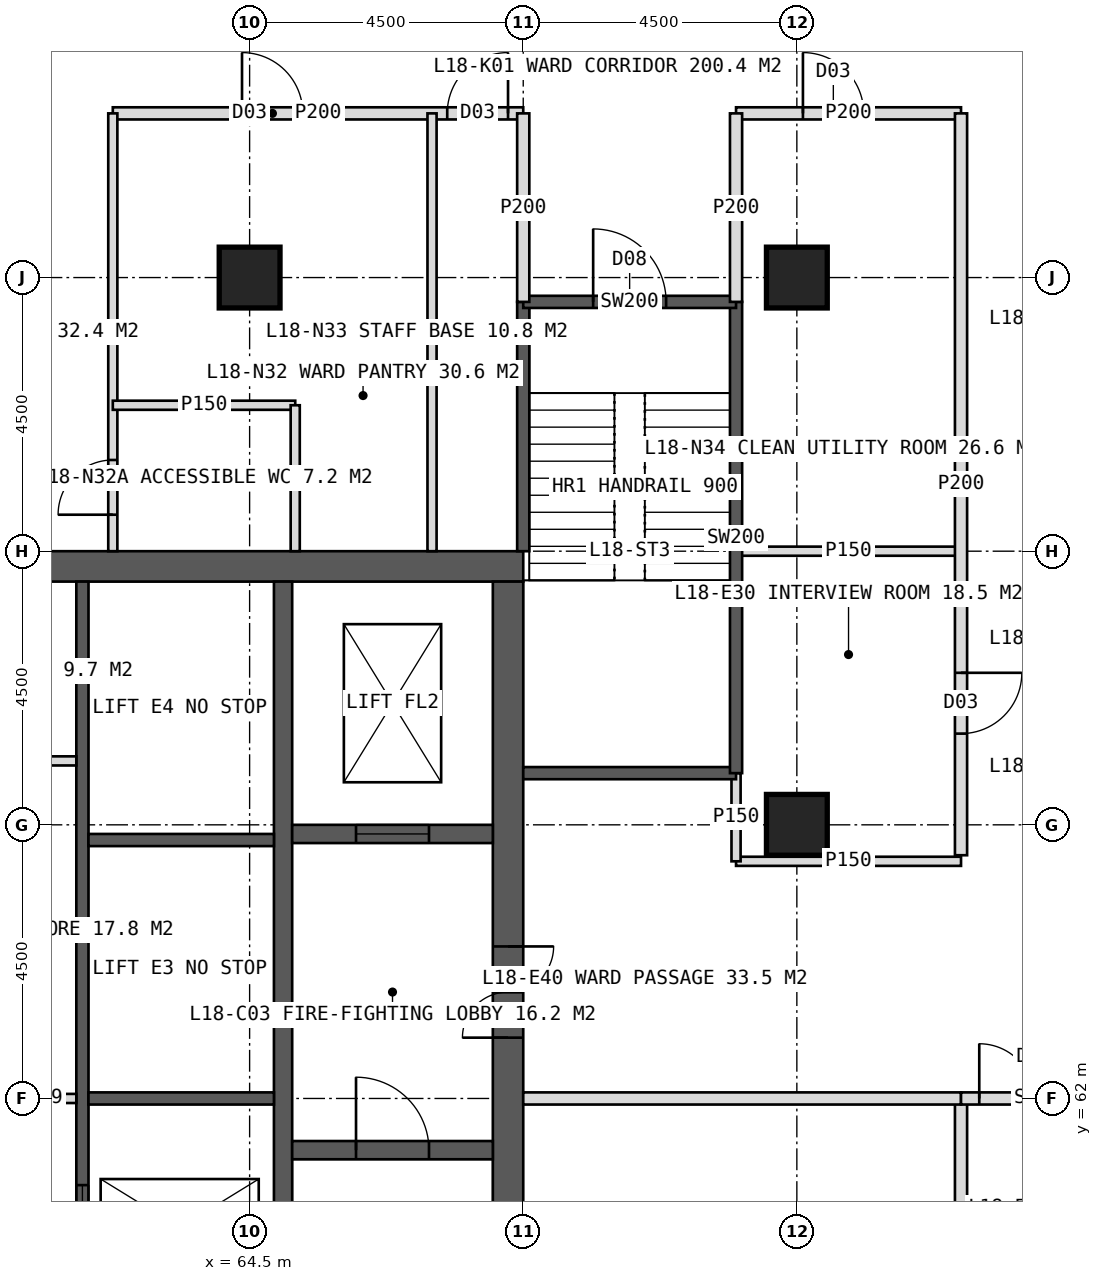
"""IFC4 building model, lengths in metres.
Left out: names, types, materials, properties, quantities, classifications, styles, units other than length and angle.
Written with IfcOpenShell. Run it as: python <this file> out.ifc"""

import sys

from ifc_helpers import new_model, si_unit, direction, frame, frame_2d, origin, origin_2d, place, context, subcontext, project, spatial, rectangle, hollow_rectangle, extrude, element, fill, save


model = new_model("IFC4")
c1 = context("Model", 3, precision=1e-05, world=origin(), true_north=direction((0.0, 1.0)))
c2 = subcontext(c1, "Body", "Model", "MODEL_VIEW")
j1 = project(units=[si_unit("LENGTHUNIT", "METRE"), si_unit("PLANEANGLEUNIT", "RADIAN")], contexts=[c1])
p1 = place(None, origin())
s1 = spatial("IfcSite", under=j1, at=p1, CompositionType="ELEMENT")
p2 = place(p1, origin())
s2 = spatial("IfcBuilding", under=s1, at=p2, CompositionType="ELEMENT")
p3 = place(p2, frame((0.0, 0.0, 79.0)))
s3 = spatial("IfcBuildingStorey", under=s2, at=p3, CompositionType="ELEMENT", Elevation=79.0)
p4 = place(p3, frame((51.0, 70.75, 0.0), z_axis=(0.0, 0.0, 1.0), x_axis=(1.0, 0.0, 0.0)))
e1 = element("IfcWall", 1, at=p4, inside=s3, PredefinedType="SHEAR", context=c2, shape_type="SweptSolid", body=[
    extrude(rectangle(XDim=18.0, YDim=0.5, at=frame_2d((9.0, 0.0))), origin(), (0.0, 0.0, 1.0), 4.0),
])
p5 = place(p4, frame((8.1, 0.0, 0.0)))
e2 = element("IfcOpeningElement", 2, at=p5, cuts=e1, PredefinedType="OPENING", context=c2, shape_type="SweptSolid", body=[
    extrude(rectangle(XDim=1.8, YDim=2.2, at=frame_2d((0.9, 1.1))), frame((0.0, 0.26, 0.0), z_axis=(0.0, -1.0, 0.0), x_axis=(1.0, 0.0, 0.0)), (0.0, 0.0, 1.0), 0.52),
])
p6 = place(p3, frame((68.75, 53.5, 0.0), z_axis=(0.0, 0.0, 1.0), x_axis=(0.0, 1.0, 0.0)))
e3 = element("IfcWall", 3, at=p6, inside=s3, PredefinedType="SHEAR", context=c2, shape_type="SweptSolid", body=[
    extrude(rectangle(XDim=17.0, YDim=0.5, at=frame_2d((8.5, 0.0))), origin(), (0.0, 0.0, 1.0), 4.0),
])
p7 = place(p6, frame((9.5, 0.0, 0.0)))
e4 = element("IfcOpeningElement", 4, at=p7, cuts=e3, PredefinedType="OPENING", context=c2, shape_type="SweptSolid", body=[
    extrude(rectangle(XDim=1.5, YDim=2.2, at=frame_2d((0.75, 1.1))), frame((0.0, 0.26, 0.0), z_axis=(0.0, -1.0, 0.0), x_axis=(1.0, 0.0, 0.0)), (0.0, 0.0, 1.0), 0.52),
])
p8 = place(p3, frame((65.05, 53.5, 0.0), z_axis=(0.0, 0.0, 1.0), x_axis=(0.0, 1.0, 0.0)))
e5 = element("IfcWall", 5, at=p8, inside=s3, PredefinedType="SHEAR", context=c2, shape_type="SweptSolid", body=[
    extrude(rectangle(XDim=17.0, YDim=0.3, at=frame_2d((8.5, 0.0))), origin(), (0.0, 0.0, 1.0), 4.0),
])
p9 = place(p3, frame((61.75, 53.5, 0.0), z_axis=(0.0, 0.0, 1.0), x_axis=(0.0, 1.0, 0.0)))
e6 = element("IfcWall", 6, at=p9, inside=s3, PredefinedType="SHEAR", context=c2, shape_type="SweptSolid", body=[
    extrude(rectangle(XDim=17.0, YDim=0.2, at=frame_2d((8.5, 0.0))), origin(), (0.0, 0.0, 1.0), 4.0),
])
p10 = place(p9, frame((1.375, 0.0, 0.0)))
e7 = element("IfcOpeningElement", 7, at=p10, cuts=e6, PredefinedType="OPENING", context=c2, shape_type="SweptSolid", body=[
    extrude(rectangle(XDim=1.4, YDim=2.2, at=frame_2d((0.7, 1.1))), frame((0.0, 0.11, 0.0), z_axis=(0.0, -1.0, 0.0), x_axis=(1.0, 0.0, 0.0)), (0.0, 0.0, 1.0), 0.22),
])
p11 = place(p9, frame((5.675, 0.0, 0.0)))
e8 = element("IfcOpeningElement", 8, at=p11, cuts=e6, PredefinedType="OPENING", context=c2, shape_type="SweptSolid", body=[
    extrude(rectangle(XDim=1.4, YDim=2.2, at=frame_2d((0.7, 1.1))), frame((0.0, 0.11, 0.0), z_axis=(0.0, -1.0, 0.0), x_axis=(1.0, 0.0, 0.0)), (0.0, 0.0, 1.0), 0.22),
])
for number, where, z_axis, x_axis in (
    (9, (61.85, 62.0, 0.0), (0.0, 0.0, 1.0), (1.0, 0.0, 0.0)),
    (10, (61.85, 66.25, 0.0), (0.0, 0.0, 1.0), (1.0, 0.0, 0.0)),
):
    element("IfcWall", number, at=place(p3, frame(where, z_axis=z_axis, x_axis=x_axis)), inside=s3, PredefinedType="SHEAR", context=c2, shape_type="SweptSolid", body=[
        extrude(rectangle(XDim=3.05, YDim=0.2, at=frame_2d((1.525, 0.0))), origin(), (0.0, 0.0, 1.0), 4.0),
    ])
p12 = place(p3, frame((65.2, 61.15, 0.0), z_axis=(0.0, 0.0, 1.0), x_axis=(1.0, 0.0, 0.0)))
e11 = element("IfcWall", 11, at=p12, inside=s3, PredefinedType="SHEAR", context=c2, shape_type="SweptSolid", body=[
    extrude(rectangle(XDim=3.3, YDim=0.3, at=frame_2d((1.65, 0.0))), origin(), (0.0, 0.0, 1.0), 4.0),
])
p13 = place(p12, frame((1.05, 0.0, 0.0)))
e12 = element("IfcOpeningElement", 12, at=p13, cuts=e11, PredefinedType="OPENING", context=c2, shape_type="SweptSolid", body=[
    extrude(rectangle(XDim=1.2, YDim=2.1, at=frame_2d((0.6, 1.05))), frame((0.0, 0.16, 0.0), z_axis=(0.0, -1.0, 0.0), x_axis=(1.0, 0.0, 0.0)), (0.0, 0.0, 1.0), 0.32),
])
p14 = place(p3, frame((65.2, 66.35, 0.0), z_axis=(0.0, 0.0, 1.0), x_axis=(1.0, 0.0, 0.0)))
e13 = element("IfcWall", 13, at=p14, inside=s3, PredefinedType="SHEAR", context=c2, shape_type="SweptSolid", body=[
    extrude(rectangle(XDim=3.3, YDim=0.3, at=frame_2d((1.65, 0.0))), origin(), (0.0, 0.0, 1.0), 4.0),
])
p15 = place(p14, frame((1.05, 0.0, 0.0)))
e14 = element("IfcOpeningElement", 14, at=p15, cuts=e13, PredefinedType="OPENING", context=c2, shape_type="SweptSolid", body=[
    extrude(rectangle(XDim=1.2, YDim=2.2, at=frame_2d((0.6, 1.1))), frame((0.0, 0.16, 0.0), z_axis=(0.0, -1.0, 0.0), x_axis=(1.0, 0.0, 0.0)), (0.0, 0.0, 1.0), 0.32),
])
for number, where, z_axis, x_axis in (
    (15, (73.5, 75.5, 0.0), (0.0, 0.0, 1.0), (1.0, 0.0, 0.0)),
    (16, (64.5, 75.5, 0.0), (0.0, 0.0, 1.0), (1.0, 0.0, 0.0)),
    (17, (73.5, 66.5, 0.0), (0.0, 0.0, 1.0), (1.0, 0.0, 0.0)),
):
    element("IfcColumn", number, at=place(p3, frame(where, z_axis=z_axis, x_axis=x_axis)), inside=s3, PredefinedType="COLUMN", context=c2, shape_type="SweptSolid", body=[
        extrude(hollow_rectangle(XDim=1.0, YDim=1.0, WallThickness=0.1, at=origin_2d()), origin(), (0.0, 0.0, 1.0), 4.0),
    ])
p16 = place(p3, frame((62.25, 78.2, 0.0), z_axis=(0.0, 0.0, 1.0), x_axis=(1.0, 0.0, 0.0)))
e18 = element("IfcWall", 18, at=p16, inside=s3, PredefinedType="PARTITIONING", context=c2, shape_type="SweptSolid", body=[
    extrude(rectangle(XDim=6.75, YDim=0.2, at=frame_2d((3.375, 0.0))), origin(), (0.0, 0.0, 1.0), 3.75),
])
p17 = place(p16, frame((2.125, 0.0, 0.0)))
e19 = element("IfcOpeningElement", 19, at=p17, cuts=e18, PredefinedType="OPENING", context=c2, shape_type="SweptSolid", body=[
    extrude(rectangle(XDim=1.0, YDim=2.1, at=frame_2d((0.5, 1.05))), frame((0.0, 0.11, 0.0), z_axis=(0.0, -1.0, 0.0), x_axis=(1.0, 0.0, 0.0)), (0.0, 0.0, 1.0), 0.22),
])
p18 = place(p16, frame((5.5, 0.0, 0.0)))
e20 = element("IfcOpeningElement", 20, at=p18, cuts=e18, PredefinedType="OPENING", context=c2, shape_type="SweptSolid", body=[
    extrude(rectangle(XDim=1.0, YDim=2.1, at=frame_2d((0.5, 1.05))), frame((0.0, 0.11, 0.0), z_axis=(0.0, -1.0, 0.0), x_axis=(1.0, 0.0, 0.0)), (0.0, 0.0, 1.0), 0.22),
])
p19 = place(p3, frame((72.5, 78.2, 0.0), z_axis=(0.0, 0.0, 1.0), x_axis=(1.0, 0.0, 0.0)))
e21 = element("IfcWall", 21, at=p19, inside=s3, PredefinedType="PARTITIONING", context=c2, shape_type="SweptSolid", body=[
    extrude(rectangle(XDim=3.7, YDim=0.2, at=frame_2d((1.85, 0.0))), origin(), (0.0, 0.0, 1.0), 3.75),
])
p20 = place(p19, frame((1.1, 0.0, 0.0)))
e22 = element("IfcOpeningElement", 22, at=p20, cuts=e21, PredefinedType="OPENING", context=c2, shape_type="SweptSolid", body=[
    extrude(rectangle(XDim=1.0, YDim=2.1, at=frame_2d((0.5, 1.05))), frame((0.0, 0.11, 0.0), z_axis=(0.0, -1.0, 0.0), x_axis=(1.0, 0.0, 0.0)), (0.0, 0.0, 1.0), 0.22),
])
p21 = place(p3, frame((62.25, 71.0, 0.0), z_axis=(0.0, 0.0, 1.0), x_axis=(0.0, 1.0, 0.0)))
e23 = element("IfcWall", 23, at=p21, inside=s3, PredefinedType="PARTITIONING", context=c2, shape_type="SweptSolid", body=[
    extrude(rectangle(XDim=7.2, YDim=0.15, at=frame_2d((3.6, 0.0))), origin(), (0.0, 0.0, 1.0), 3.75),
])
p22 = place(p21, frame((0.6, 0.0, 0.0)))
e24 = element("IfcOpeningElement", 24, at=p22, cuts=e23, PredefinedType="OPENING", context=c2, shape_type="SweptSolid", body=[
    extrude(rectangle(XDim=0.9, YDim=2.1, at=frame_2d((0.45, 1.05))), frame((0.0, 0.085, 0.0), z_axis=(0.0, -1.0, 0.0), x_axis=(1.0, 0.0, 0.0)), (0.0, 0.0, 1.0), 0.17),
])
p23 = place(p3, frame((67.5, 71.0, 0.0), z_axis=(0.0, 0.0, 1.0), x_axis=(0.0, 1.0, 0.0)))
e25 = element("IfcWall", 25, at=p23, inside=s3, PredefinedType="PARTITIONING", context=c2, shape_type="SweptSolid", body=[
    extrude(rectangle(XDim=7.2, YDim=0.15, at=frame_2d((3.6, 0.0))), origin(), (0.0, 0.0, 1.0), 3.75),
])
p24 = place(p3, frame((62.25, 73.4, 0.0), z_axis=(0.0, 0.0, 1.0), x_axis=(1.0, 0.0, 0.0)))
e26 = element("IfcWall", 26, at=p24, inside=s3, PredefinedType="PARTITIONING", context=c2, shape_type="SweptSolid", body=[
    extrude(rectangle(XDim=3.0, YDim=0.15, at=frame_2d((1.5, 0.0))), origin(), (0.0, 0.0, 1.0), 3.75),
])
p25 = place(p3, frame((65.25, 71.0, 0.0), z_axis=(0.0, 0.0, 1.0), x_axis=(0.0, 1.0, 0.0)))
e27 = element("IfcWall", 27, at=p25, inside=s3, PredefinedType="PARTITIONING", context=c2, shape_type="SweptSolid", body=[
    extrude(rectangle(XDim=2.4, YDim=0.15, at=frame_2d((1.2, 0.0))), origin(), (0.0, 0.0, 1.0), 3.75),
])
p26 = place(p3, frame((72.5, 71.0, 0.0), z_axis=(0.0, 0.0, 1.0), x_axis=(1.0, 0.0, 0.0)))
e28 = element("IfcWall", 28, at=p26, inside=s3, PredefinedType="PARTITIONING", context=c2, shape_type="SweptSolid", body=[
    extrude(rectangle(XDim=3.7, YDim=0.15, at=frame_2d((1.85, 0.0))), origin(), (0.0, 0.0, 1.0), 3.75),
])
p27 = place(p3, frame((76.2, 78.2, 0.0), z_axis=(0.0, 0.0, 1.0), x_axis=(0.0, -1.0, 0.0)))
e29 = element("IfcWall", 29, at=p27, inside=s3, PredefinedType="PARTITIONING", context=c2, shape_type="SweptSolid", body=[
    extrude(rectangle(XDim=12.2, YDim=0.2, at=frame_2d((6.1, 0.0))), origin(), (0.0, 0.0, 1.0), 3.75),
])
p28 = place(p27, frame((9.2, 0.0, 0.0)))
e30 = element("IfcOpeningElement", 30, at=p28, cuts=e29, PredefinedType="OPENING", context=c2, shape_type="SweptSolid", body=[
    extrude(rectangle(XDim=1.0, YDim=2.1, at=frame_2d((0.5, 1.05))), frame((0.0, 0.11, 0.0), z_axis=(0.0, -1.0, 0.0), x_axis=(1.0, 0.0, 0.0)), (0.0, 0.0, 1.0), 0.22),
])
p29 = place(p3, frame((76.2, 62.0, 0.0), z_axis=(0.0, 0.0, 1.0), x_axis=(0.0, -1.0, 0.0)))
e31 = element("IfcWall", 31, at=p29, inside=s3, PredefinedType="PARTITIONING", context=c2, shape_type="SweptSolid", body=[
    extrude(rectangle(XDim=16.2, YDim=0.2, at=frame_2d((8.1, 0.0))), origin(), (0.0, 0.0, 1.0), 3.75),
])
p30 = place(p29, frame((2.5, 0.0, 0.0)))
e32 = element("IfcOpeningElement", 32, at=p30, cuts=e31, PredefinedType="OPENING", context=c2, shape_type="SweptSolid", body=[
    extrude(rectangle(XDim=1.0, YDim=2.1, at=frame_2d((0.5, 1.05))), frame((0.0, 0.11, 0.0), z_axis=(0.0, -1.0, 0.0), x_axis=(1.0, 0.0, 0.0)), (0.0, 0.0, 1.0), 0.22),
])
p31 = place(p29, frame((7.75, 0.0, 0.0)))
e33 = element("IfcOpeningElement", 33, at=p31, cuts=e31, PredefinedType="OPENING", context=c2, shape_type="SweptSolid", body=[
    extrude(rectangle(XDim=1.0, YDim=2.1, at=frame_2d((0.5, 1.05))), frame((0.0, 0.11, 0.0), z_axis=(0.0, -1.0, 0.0), x_axis=(1.0, 0.0, 0.0)), (0.0, 0.0, 1.0), 0.22),
])
p32 = place(p29, frame((12.85, 0.0, 0.0)))
e34 = element("IfcOpeningElement", 34, at=p32, cuts=e31, PredefinedType="OPENING", context=c2, shape_type="SweptSolid", body=[
    extrude(rectangle(XDim=1.0, YDim=2.1, at=frame_2d((0.5, 1.05))), frame((0.0, 0.11, 0.0), z_axis=(0.0, -1.0, 0.0), x_axis=(1.0, 0.0, 0.0)), (0.0, 0.0, 1.0), 0.22),
])
p33 = place(p3, frame((72.5, 65.9, 0.0), z_axis=(0.0, 0.0, 1.0), x_axis=(1.0, 0.0, 0.0)))
e35 = element("IfcWall", 35, at=p33, inside=s3, PredefinedType="PARTITIONING", context=c2, shape_type="SweptSolid", body=[
    extrude(rectangle(XDim=3.7, YDim=0.15, at=frame_2d((1.85, 0.0))), origin(), (0.0, 0.0, 1.0), 3.75),
])
p34 = place(p3, frame((69.0, 62.0, 0.0), z_axis=(0.0, 0.0, 1.0), x_axis=(1.0, 0.0, 0.0)))
e36 = element("IfcWall", 36, at=p34, inside=s3, PredefinedType="SOLIDWALL", context=c2, shape_type="SweptSolid", body=[
    extrude(rectangle(XDim=7.2, YDim=0.2, at=frame_2d((3.6, 0.0))), origin(), (0.0, 0.0, 1.0), 2.75),
])
p35 = place(p3, frame((76.2, 62.0, 0.0), z_axis=(0.0, 0.0, 1.0), x_axis=(1.0, 0.0, 0.0)))
e37 = element("IfcWall", 37, at=p35, inside=s3, PredefinedType="SOLIDWALL", context=c2, shape_type="SweptSolid", body=[
    extrude(rectangle(XDim=2.7, YDim=0.2, at=frame_2d((1.35, 0.0))), origin(), (0.0, 0.0, 1.0), 2.75),
])
p36 = place(p35, frame((0.3, 0.0, 0.0)))
e38 = element("IfcOpeningElement", 38, at=p36, cuts=e37, PredefinedType="OPENING", context=c2, shape_type="SweptSolid", body=[
    extrude(rectangle(XDim=1.8, YDim=2.2, at=frame_2d((0.9, 1.1))), frame((0.0, 0.11, 0.0), z_axis=(0.0, -1.0, 0.0), x_axis=(1.0, 0.0, 0.0)), (0.0, 0.0, 1.0), 0.22),
])
p37 = place(p3, frame((58.35, 62.0, 0.0), z_axis=(0.0, 0.0, 1.0), x_axis=(1.0, 0.0, 0.0)))
e39 = element("IfcWall", 39, at=p37, inside=s3, PredefinedType="PARTITIONING", context=c2, shape_type="SweptSolid", body=[
    extrude(rectangle(XDim=3.3, YDim=0.15, at=frame_2d((1.65, 0.0))), origin(), (0.0, 0.0, 1.0), 3.75),
])
p38 = place(p37, frame((1.15, 0.0, 0.0)))
e40 = element("IfcOpeningElement", 40, at=p38, cuts=e39, PredefinedType="OPENING", context=c2, shape_type="SweptSolid", body=[
    extrude(rectangle(XDim=1.0, YDim=2.1, at=frame_2d((0.5, 1.05))), frame((0.0, 0.085, 0.0), z_axis=(0.0, -1.0, 0.0), x_axis=(1.0, 0.0, 0.0)), (0.0, 0.0, 1.0), 0.17),
])
p39 = place(p3, frame((58.35, 67.551, 0.0), z_axis=(0.0, 0.0, 1.0), x_axis=(1.0, 0.0, 0.0)))
e41 = element("IfcWall", 41, at=p39, inside=s3, PredefinedType="PARTITIONING", context=c2, shape_type="SweptSolid", body=[
    extrude(rectangle(XDim=3.3, YDim=0.15, at=frame_2d((1.65, 0.0))), origin(), (0.0, 0.0, 1.0), 3.75),
])
p40 = place(p3, frame((72.5, 65.9, 0.0), z_axis=(0.0, 0.0, 1.0), x_axis=(0.0, 1.0, 0.0)))
e42 = element("IfcWall", 42, at=p40, inside=s3, PredefinedType="PARTITIONING", context=c2, shape_type="SweptSolid", body=[
    extrude(rectangle(XDim=1.45, YDim=0.15, at=frame_2d((0.725, 0.0))), origin(), (0.0, 0.0, 1.0), 3.75),
])
p41 = place(p3, frame((69.0, 71.0, 0.0), z_axis=(0.0, 0.0, 1.0), x_axis=(0.0, 1.0, 0.0)))
e43 = element("IfcWall", 43, at=p41, inside=s3, PredefinedType="SOLIDWALL", context=c2, shape_type="SweptSolid", body=[
    extrude(rectangle(XDim=4.1, YDim=0.2, at=frame_2d((2.05, 0.0))), origin(), (0.0, 0.0, 1.0), 3.75),
])
p42 = place(p3, frame((69.0, 67.35, 0.0), z_axis=(0.0, 0.0, 1.0), x_axis=(1.0, 0.0, 0.0)))
e44 = element("IfcWall", 44, at=p42, inside=s3, PredefinedType="SOLIDWALL", context=c2, shape_type="SweptSolid", body=[
    extrude(rectangle(XDim=3.5, YDim=0.2, at=frame_2d((1.75, 0.0))), origin(), (0.0, 0.0, 1.0), 3.75),
])
p43 = place(p3, frame((72.5, 67.35, 0.0), z_axis=(0.0, 0.0, 1.0), x_axis=(0.0, 1.0, 0.0)))
e45 = element("IfcWall", 45, at=p43, inside=s3, PredefinedType="SOLIDWALL", context=c2, shape_type="SweptSolid", body=[
    extrude(rectangle(XDim=7.75, YDim=0.2, at=frame_2d((3.875, 0.0))), origin(), (0.0, 0.0, 1.0), 3.75),
])
p44 = place(p3, frame((69.0, 75.1, 0.0), z_axis=(0.0, 0.0, 1.0), x_axis=(1.0, 0.0, 0.0)))
e46 = element("IfcWall", 46, at=p44, inside=s3, PredefinedType="SOLIDWALL", context=c2, shape_type="SweptSolid", body=[
    extrude(rectangle(XDim=3.5, YDim=0.2, at=frame_2d((1.75, 0.0))), origin(), (0.0, 0.0, 1.0), 3.75),
])
p45 = place(p44, frame((1.15, 0.0, 0.0)))
e47 = element("IfcOpeningElement", 47, at=p45, cuts=e46, PredefinedType="OPENING", context=c2, shape_type="SweptSolid", body=[
    extrude(rectangle(XDim=1.2, YDim=2.1, at=frame_2d((0.6, 1.05))), frame((0.0, 0.11, 0.0), z_axis=(0.0, -1.0, 0.0), x_axis=(1.0, 0.0, 0.0)), (0.0, 0.0, 1.0), 0.22),
])
for number, where, z_axis, x_axis in (
    (48, (69.0, 75.1, 0.0), (0.0, 0.0, 1.0), (0.0, 1.0, 0.0)),
    (49, (72.5, 75.1, 0.0), (0.0, 0.0, 1.0), (0.0, 1.0, 0.0)),
):
    element("IfcWall", number, at=place(p3, frame(where, z_axis=z_axis, x_axis=x_axis)), inside=s3, PredefinedType="PARTITIONING", context=c2, shape_type="SweptSolid", body=[
        extrude(rectangle(XDim=3.1, YDim=0.2, at=frame_2d((1.55, 0.0))), origin(), (0.0, 0.0, 1.0), 3.75),
    ])
p46 = place(p22, origin())
e50 = element("IfcDoor", 50, at=p46, inside=s3, OperationType="SINGLE_SWING_LEFT", PredefinedType="DOOR", context=c2, shape_type="SweptSolid", body=[
    extrude(rectangle(XDim=0.9, YDim=2.1, at=frame_2d((0.45, 1.05))), frame((0.0, 0.025, 0.0), z_axis=(0.0, -1.0, 0.0), x_axis=(1.0, 0.0, 0.0)), (0.0, 0.0, 1.0), 0.05),
])
fill(e24, e50)
p47 = place(p17, origin())
e51 = element("IfcDoor", 51, at=p47, inside=s3, OperationType="SINGLE_SWING_LEFT", PredefinedType="DOOR", context=c2, shape_type="SweptSolid", body=[
    extrude(rectangle(XDim=1.0, YDim=2.1, at=frame_2d((0.5, 1.05))), frame((0.0, 0.025, 0.0), z_axis=(0.0, -1.0, 0.0), x_axis=(1.0, 0.0, 0.0)), (0.0, 0.0, 1.0), 0.05),
])
fill(e19, e51)
p48 = place(p18, origin())
e52 = element("IfcDoor", 52, at=p48, inside=s3, OperationType="SINGLE_SWING_RIGHT", PredefinedType="DOOR", context=c2, shape_type="SweptSolid", body=[
    extrude(rectangle(XDim=1.0, YDim=2.1, at=frame_2d((0.5, 1.05))), frame((0.0, 0.025, 0.0), z_axis=(0.0, -1.0, 0.0), x_axis=(1.0, 0.0, 0.0)), (0.0, 0.0, 1.0), 0.05),
])
fill(e20, e52)
p49 = place(p20, origin())
e53 = element("IfcDoor", 53, at=p49, inside=s3, OperationType="SINGLE_SWING_LEFT", PredefinedType="DOOR", context=c2, shape_type="SweptSolid", body=[
    extrude(rectangle(XDim=1.0, YDim=2.1, at=frame_2d((0.5, 1.05))), frame((0.0, 0.025, 0.0), z_axis=(0.0, -1.0, 0.0), x_axis=(1.0, 0.0, 0.0)), (0.0, 0.0, 1.0), 0.05),
])
fill(e22, e53)
p50 = place(p28, origin())
e54 = element("IfcDoor", 54, at=p50, inside=s3, OperationType="SINGLE_SWING_LEFT", PredefinedType="DOOR", context=c2, shape_type="SweptSolid", body=[
    extrude(rectangle(XDim=1.0, YDim=2.1, at=frame_2d((0.5, 1.05))), frame((0.0, 0.025, 0.0), z_axis=(0.0, -1.0, 0.0), x_axis=(1.0, 0.0, 0.0)), (0.0, 0.0, 1.0), 0.05),
])
fill(e30, e54)
p51 = place(p36, origin())
e55 = element("IfcDoor", 55, at=p51, inside=s3, OperationType="DOUBLE_DOOR_DOUBLE_SWING", PredefinedType="DOOR", context=c2, shape_type="SweptSolid", body=[
    extrude(rectangle(XDim=1.8, YDim=2.2, at=frame_2d((0.9, 1.1))), frame((0.0, 0.025, 0.0), z_axis=(0.0, -1.0, 0.0), x_axis=(1.0, 0.0, 0.0)), (0.0, 0.0, 1.0), 0.05),
])
fill(e38, e55)
p52 = place(p7, origin())
e56 = element("IfcDoor", 56, at=p52, inside=s3, OperationType="DOUBLE_DOOR_SINGLE_SWING", PredefinedType="DOOR", context=c2, shape_type="SweptSolid", body=[
    extrude(rectangle(XDim=1.5, YDim=2.2, at=frame_2d((0.75, 1.1))), frame((0.0, 0.025, 0.0), z_axis=(0.0, -1.0, 0.0), x_axis=(1.0, 0.0, 0.0)), (0.0, 0.0, 1.0), 0.05),
])
fill(e4, e56)
p53 = place(p13, origin())
e57 = element("IfcDoor", 57, at=p53, inside=s3, OperationType="SINGLE_SWING_LEFT", PredefinedType="DOOR", context=c2, shape_type="SweptSolid", body=[
    extrude(rectangle(XDim=1.2, YDim=2.1, at=frame_2d((0.6, 1.05))), frame((0.0, 0.025, 0.0), z_axis=(0.0, -1.0, 0.0), x_axis=(1.0, 0.0, 0.0)), (0.0, 0.0, 1.0), 0.05),
])
fill(e12, e57)
p54 = place(p15, origin())
e58 = element("IfcDoor", 58, at=p54, inside=s3, OperationType="SLIDING_TO_LEFT", PredefinedType="DOOR", context=c2, shape_type="SweptSolid", body=[
    extrude(rectangle(XDim=1.2, YDim=2.2, at=frame_2d((0.6, 1.1))), frame((0.0, 0.025, 0.0), z_axis=(0.0, -1.0, 0.0), x_axis=(1.0, 0.0, 0.0)), (0.0, 0.0, 1.0), 0.05),
])
fill(e14, e58)
p55 = place(p11, origin())
e59 = element("IfcDoor", 59, at=p55, inside=s3, OperationType="SLIDING_TO_LEFT", PredefinedType="DOOR", context=c2, shape_type="SweptSolid", body=[
    extrude(rectangle(XDim=1.4, YDim=2.2, at=frame_2d((0.7, 1.1))), frame((0.0, 0.025, 0.0), z_axis=(0.0, -1.0, 0.0), x_axis=(1.0, 0.0, 0.0)), (0.0, 0.0, 1.0), 0.05),
])
fill(e8, e59)
p56 = place(p45, origin())
e60 = element("IfcDoor", 60, at=p56, inside=s3, OperationType="SINGLE_SWING_LEFT", PredefinedType="DOOR", context=c2, shape_type="SweptSolid", body=[
    extrude(rectangle(XDim=1.2, YDim=2.1, at=frame_2d((0.6, 1.05))), frame((0.0, 0.025, 0.0), z_axis=(0.0, -1.0, 0.0), x_axis=(1.0, 0.0, 0.0)), (0.0, 0.0, 1.0), 0.05),
])
fill(e47, e60)
save(model, sys.argv[1])
